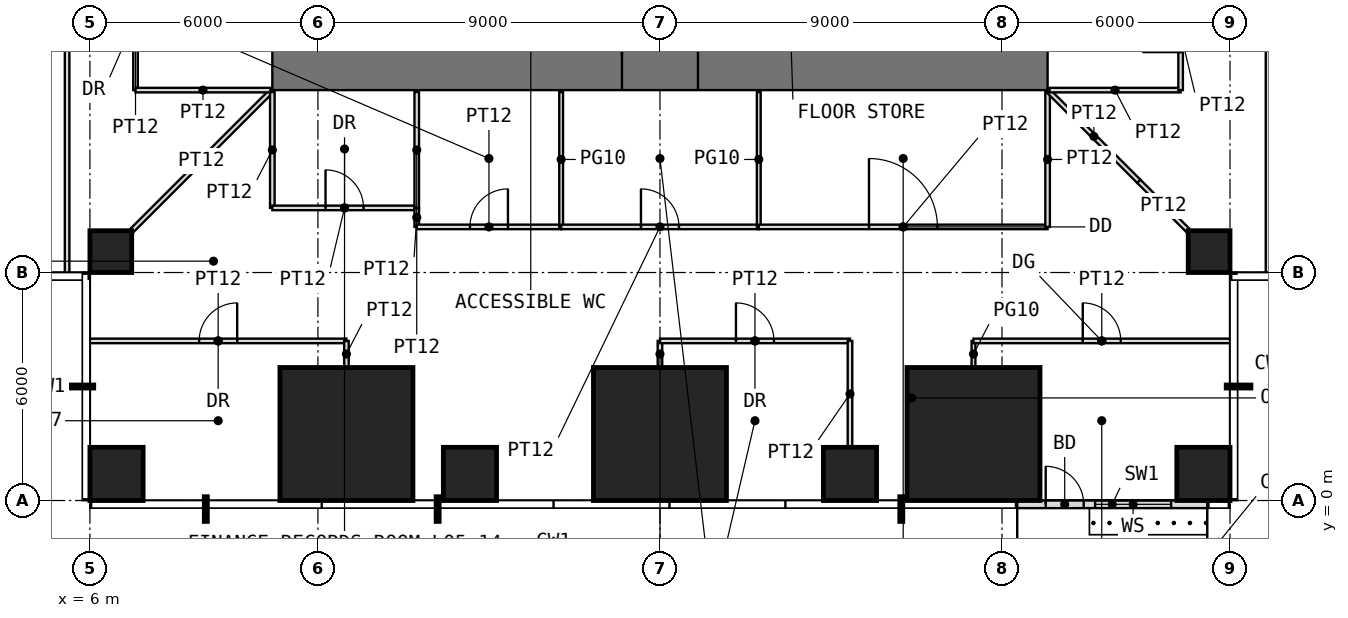
"""IFC4 building model, lengths in metres.
Left out: names, types, materials, properties, quantities, classifications, styles, units other than length and angle.
Written with IfcOpenShell. Run it as: python <this file> out.ifc"""

import sys

from ifc_helpers import new_model, si_unit, direction, frame, frame_2d, origin, origin_2d, place, context, subcontext, project, spatial, rectangle, extrude, element, fill, save


model = new_model("IFC4")
c1 = context("Model", 3, precision=1e-05, world=origin(), true_north=direction((0.0, 1.0)))
c2 = subcontext(c1, "Body", "Model", "MODEL_VIEW")
j1 = project(units=[si_unit("LENGTHUNIT", "METRE"), si_unit("PLANEANGLEUNIT", "RADIAN")], contexts=[c1])
p1 = place(None, origin())
s1 = spatial("IfcSite", under=j1, at=p1, CompositionType="ELEMENT")
p2 = place(p1, origin())
s2 = spatial("IfcBuilding", under=s1, at=p2, CompositionType="ELEMENT")
p3 = place(p2, frame((0.0, 0.0, 26.5)))
s3 = spatial("IfcBuildingStorey", under=s2, at=p3, CompositionType="ELEMENT", Elevation=26.5)
p4 = place(p3, frame((6.7, 0.7, 0.0), z_axis=(0.0, 0.0, 1.0), x_axis=(1.0, 0.0, 0.0)))
e1 = element("IfcColumn", 1, at=p4, inside=s3, PredefinedType="COLUMN", context=c2, shape_type="SweptSolid", body=[
    extrude(rectangle(XDim=1.4, YDim=1.4, at=origin_2d()), origin(), (0.0, 0.0, 1.0), 4.0),
])
p5 = place(p3, frame((12.75, 1.75, 0.0), z_axis=(0.0, 0.0, 1.0), x_axis=(1.0, 0.0, 0.0)))
e2 = element("IfcColumn", 2, at=p5, inside=s3, PredefinedType="COLUMN", context=c2, shape_type="SweptSolid", body=[
    extrude(rectangle(XDim=3.5, YDim=3.5, at=origin_2d()), origin(), (0.0, 0.0, 1.0), 4.0),
])
p6 = place(p3, frame((16.0, 0.7, 0.0), z_axis=(0.0, 0.0, 1.0), x_axis=(1.0, 0.0, 0.0)))
e3 = element("IfcColumn", 3, at=p6, inside=s3, PredefinedType="COLUMN", context=c2, shape_type="SweptSolid", body=[
    extrude(rectangle(XDim=1.4, YDim=1.4, at=origin_2d()), origin(), (0.0, 0.0, 1.0), 4.0),
])
p7 = place(p3, frame((21.0, 1.75, 0.0), z_axis=(0.0, 0.0, 1.0), x_axis=(1.0, 0.0, 0.0)))
e4 = element("IfcColumn", 4, at=p7, inside=s3, PredefinedType="COLUMN", context=c2, shape_type="SweptSolid", body=[
    extrude(rectangle(XDim=3.5, YDim=3.5, at=origin_2d()), origin(), (0.0, 0.0, 1.0), 4.0),
])
p8 = place(p3, frame((26.0, 0.7, 0.0), z_axis=(0.0, 0.0, 1.0), x_axis=(1.0, 0.0, 0.0)))
e5 = element("IfcColumn", 5, at=p8, inside=s3, PredefinedType="COLUMN", context=c2, shape_type="SweptSolid", body=[
    extrude(rectangle(XDim=1.4, YDim=1.4, at=origin_2d()), origin(), (0.0, 0.0, 1.0), 4.0),
])
p9 = place(p3, frame((29.25, 1.75, 0.0), z_axis=(0.0, 0.0, 1.0), x_axis=(1.0, 0.0, 0.0)))
e6 = element("IfcColumn", 6, at=p9, inside=s3, PredefinedType="COLUMN", context=c2, shape_type="SweptSolid", body=[
    extrude(rectangle(XDim=3.5, YDim=3.5, at=origin_2d()), origin(), (0.0, 0.0, 1.0), 4.0),
])
p10 = place(p3, frame((35.3, 0.7, 0.0), z_axis=(0.0, 0.0, 1.0), x_axis=(1.0, 0.0, 0.0)))
e7 = element("IfcColumn", 7, at=p10, inside=s3, PredefinedType="COLUMN", context=c2, shape_type="SweptSolid", body=[
    extrude(rectangle(XDim=1.4, YDim=1.4, at=origin_2d()), origin(), (0.0, 0.0, 1.0), 4.0),
])
for number, where, z_axis, x_axis in (
    (8, (6.55, 6.55, 0.0), (0.0, 0.0, 1.0), (1.0, 0.0, 0.0)),
    (9, (35.45, 6.55, 0.0), (0.0, 0.0, 1.0), (1.0, 0.0, 0.0)),
):
    element("IfcColumn", number, at=place(p3, frame(where, z_axis=z_axis, x_axis=x_axis)), inside=s3, PredefinedType="COLUMN", context=c2, shape_type="SweptSolid", body=[
        extrude(rectangle(XDim=1.1, YDim=1.1, at=origin_2d()), origin(), (0.0, 0.0, 1.0), 4.0),
    ])
p11 = place(p3, frame((30.4, -0.1, 0.0), z_axis=(0.0, 0.0, 1.0), x_axis=(1.0, 0.0, 0.0)))
e10 = element("IfcWall", 10, at=p11, inside=s3, PredefinedType="USERDEFINED", context=c2, shape_type="SweptSolid", body=[
    extrude(rectangle(XDim=5.0, YDim=0.2, at=frame_2d((2.5, 0.0))), origin(), (0.0, 0.0, 1.0), 3.75),
])
p12 = place(p11, frame((0.75, 0.0, 0.0)))
e11 = element("IfcOpeningElement", 11, at=p12, cuts=e10, PredefinedType="OPENING", context=c2, shape_type="SweptSolid", body=[
    extrude(rectangle(XDim=1.0, YDim=2.4, at=frame_2d((0.5, 1.2))), frame((0.0, 0.11, 0.0), z_axis=(0.0, -1.0, 0.0), x_axis=(1.0, 0.0, 0.0)), (0.0, 0.0, 1.0), 0.22),
])
p13 = place(p11, frame((2.05, 0.0, 0.3)))
e12 = element("IfcOpeningElement", 12, at=p13, cuts=e10, PredefinedType="OPENING", context=c2, shape_type="SweptSolid", body=[
    extrude(rectangle(XDim=2.0, YDim=2.7, at=frame_2d((1.0, 1.35))), frame((0.0, 0.11, 0.0), z_axis=(0.0, -1.0, 0.0), x_axis=(1.0, 0.0, 0.0)), (0.0, 0.0, 1.0), 0.22),
])
p14 = place(p3, frame((10.8, 11.7, -0.05), z_axis=(0.0, 0.0, 1.0), x_axis=(1.0, 0.0, 0.0)))
e13 = element("IfcWall", 13, at=p14, inside=s3, PredefinedType="SHEAR", context=c2, shape_type="SweptSolid", body=[
    extrude(rectangle(XDim=20.4, YDim=1.8, at=frame_2d((10.2, 0.0))), origin(), (0.0, 0.0, 1.0), 4.0),
])
p15 = place(p14, frame((9.2, 0.0, 0.05)))
e14 = element("IfcOpeningElement", 14, at=p15, cuts=e13, PredefinedType="OPENING", context=c2, shape_type="SweptSolid", body=[
    extrude(rectangle(XDim=2.0, YDim=2.2, at=frame_2d((1.0, 1.1))), frame((0.0, 0.91, 0.0), z_axis=(0.0, -1.0, 0.0), x_axis=(1.0, 0.0, 0.0)), (0.0, 0.0, 1.0), 1.82),
])
p16 = place(p3, frame((5.4, 6.0, 0.0), z_axis=(0.0, 0.0, 1.0), x_axis=(0.0, 1.0, 0.0)))
e15 = element("IfcWall", 15, at=p16, inside=s3, PredefinedType="PARTITIONING", context=c2, shape_type="SweptSolid", body=[
    extrude(rectangle(XDim=30.0, YDim=0.12, at=frame_2d((15.0, 0.0))), origin(), (0.0, 0.0, 1.0), 3.75),
])
p17 = place(p16, frame((14.5, 0.0, 0.0)))
e16 = element("IfcOpeningElement", 16, at=p17, cuts=e15, PredefinedType="OPENING", context=c2, shape_type="SweptSolid", body=[
    extrude(rectangle(XDim=1.0, YDim=2.4, at=frame_2d((0.5, 1.2))), frame((0.0, 0.07, 0.0), z_axis=(0.0, -1.0, 0.0), x_axis=(1.0, 0.0, 0.0)), (0.0, 0.0, 1.0), 0.14),
])
p18 = place(p3, frame((6.0, 4.2, 0.0), z_axis=(0.0, 0.0, 1.0), x_axis=(1.0, 0.0, 0.0)))
e17 = element("IfcWall", 17, at=p18, inside=s3, PredefinedType="PARTITIONING", context=c2, shape_type="SweptSolid", body=[
    extrude(rectangle(XDim=6.75, YDim=0.12, at=frame_2d((3.375, 0.0))), origin(), (0.0, 0.0, 1.0), 3.75),
])
p19 = place(p18, frame((2.875, 0.0, 0.0)))
e18 = element("IfcOpeningElement", 18, at=p19, cuts=e17, PredefinedType="OPENING", context=c2, shape_type="SweptSolid", body=[
    extrude(rectangle(XDim=1.0, YDim=2.2, at=frame_2d((0.5, 1.1))), frame((0.0, 0.07, 0.0), z_axis=(0.0, -1.0, 0.0), x_axis=(1.0, 0.0, 0.0)), (0.0, 0.0, 1.0), 0.14),
])
p20 = place(p3, frame((7.11, 7.11, 0.0), z_axis=(0.0, 0.0, 1.0), x_axis=(0.707106781187, 0.707106781187, 0.0)))
e19 = element("IfcWall", 19, at=p20, inside=s3, PredefinedType="PARTITIONING", context=c2, shape_type="SweptSolid", body=[
    extrude(rectangle(XDim=5.168, YDim=0.12, at=frame_2d((2.584, 0.0))), origin(), (0.0, 0.0, 1.0), 3.75),
])
p21 = place(p3, frame((7.2, 10.8, 0.0), z_axis=(0.0, 0.0, 1.0), x_axis=(0.0, 1.0, 0.0)))
e20 = element("IfcWall", 20, at=p21, inside=s3, PredefinedType="PARTITIONING", context=c2, shape_type="SweptSolid", body=[
    extrude(rectangle(XDim=3.8, YDim=0.12, at=frame_2d((1.9, 0.0))), origin(), (0.0, 0.0, 1.0), 3.75),
])
p22 = place(p21, frame((1.4, 0.0, 0.0)))
e21 = element("IfcOpeningElement", 21, at=p22, cuts=e20, PredefinedType="OPENING", context=c2, shape_type="SweptSolid", body=[
    extrude(rectangle(XDim=1.0, YDim=2.2, at=frame_2d((0.5, 1.1))), frame((0.0, 0.07, 0.0), z_axis=(0.0, -1.0, 0.0), x_axis=(1.0, 0.0, 0.0)), (0.0, 0.0, 1.0), 0.14),
])
p23 = place(p3, frame((7.2, 10.8, 0.0), z_axis=(0.0, 0.0, 1.0), x_axis=(1.0, 0.0, 0.0)))
e22 = element("IfcWall", 22, at=p23, inside=s3, PredefinedType="PARTITIONING", context=c2, shape_type="SweptSolid", body=[
    extrude(rectangle(XDim=3.55, YDim=0.12, at=frame_2d((1.775, 0.0))), origin(), (0.0, 0.0, 1.0), 3.75),
])
p24 = place(p3, frame((10.8, 7.7, 0.0), z_axis=(0.0, 0.0, 1.0), x_axis=(0.0, 1.0, 0.0)))
e23 = element("IfcWall", 23, at=p24, inside=s3, PredefinedType="PARTITIONING", context=c2, shape_type="SweptSolid", body=[
    extrude(rectangle(XDim=3.05, YDim=0.12, at=frame_2d((1.525, 0.0))), origin(), (0.0, 0.0, 1.0), 3.75),
])
p25 = place(p3, frame((10.8, 7.7, 0.0), z_axis=(0.0, 0.0, 1.0), x_axis=(1.0, 0.0, 0.0)))
e24 = element("IfcWall", 24, at=p25, inside=s3, PredefinedType="PARTITIONING", context=c2, shape_type="SweptSolid", body=[
    extrude(rectangle(XDim=3.8, YDim=0.12, at=frame_2d((1.9, 0.0))), origin(), (0.0, 0.0, 1.0), 3.75),
])
p26 = place(p25, frame((1.4, 0.0, 0.0)))
e25 = element("IfcOpeningElement", 25, at=p26, cuts=e24, PredefinedType="OPENING", context=c2, shape_type="SweptSolid", body=[
    extrude(rectangle(XDim=1.0, YDim=2.2, at=frame_2d((0.5, 1.1))), frame((0.0, 0.07, 0.0), z_axis=(0.0, -1.0, 0.0), x_axis=(1.0, 0.0, 0.0)), (0.0, 0.0, 1.0), 0.14),
])
p27 = place(p3, frame((12.75, 3.51, 0.0), z_axis=(0.0, 0.0, 1.0), x_axis=(0.0, 1.0, 0.0)))
e26 = element("IfcWall", 26, at=p27, inside=s3, PredefinedType="PARTITIONING", context=c2, shape_type="SweptSolid", body=[
    extrude(rectangle(XDim=0.69, YDim=0.12, at=frame_2d((0.345, 0.0))), origin(), (0.0, 0.0, 1.0), 3.75),
])
p28 = place(p3, frame((14.6, 7.2, 0.0), z_axis=(0.0, 0.0, 1.0), x_axis=(0.0, 1.0, 0.0)))
e27 = element("IfcWall", 27, at=p28, inside=s3, PredefinedType="PARTITIONING", context=c2, shape_type="SweptSolid", body=[
    extrude(rectangle(XDim=0.5, YDim=0.12, at=frame_2d((0.25, 0.0))), origin(), (0.0, 0.0, 1.0), 3.75),
])
p29 = place(p3, frame((14.6, 7.2, 0.0), z_axis=(0.0, 0.0, 1.0), x_axis=(1.0, 0.0, 0.0)))
e28 = element("IfcWall", 28, at=p29, inside=s3, PredefinedType="PARTITIONING", context=c2, shape_type="SweptSolid", body=[
    extrude(rectangle(XDim=3.8, YDim=0.12, at=frame_2d((1.9, 0.0))), origin(), (0.0, 0.0, 1.0), 3.75),
])
p30 = place(p29, frame((1.4, 0.0, 0.0)))
e29 = element("IfcOpeningElement", 29, at=p30, cuts=e28, PredefinedType="OPENING", context=c2, shape_type="SweptSolid", body=[
    extrude(rectangle(XDim=1.0, YDim=2.4, at=frame_2d((0.5, 1.2))), frame((0.0, 0.07, 0.0), z_axis=(0.0, -1.0, 0.0), x_axis=(1.0, 0.0, 0.0)), (0.0, 0.0, 1.0), 0.14),
])
p31 = place(p3, frame((14.6, 7.7, 0.0), z_axis=(0.0, 0.0, 1.0), x_axis=(0.0, 1.0, 0.0)))
e30 = element("IfcWall", 30, at=p31, inside=s3, PredefinedType="PARTITIONING", context=c2, shape_type="SweptSolid", body=[
    extrude(rectangle(XDim=3.05, YDim=0.12, at=frame_2d((1.525, 0.0))), origin(), (0.0, 0.0, 1.0), 3.75),
])
p32 = place(p3, frame((18.4, 7.2, 0.0), z_axis=(0.0, 0.0, 1.0), x_axis=(0.0, 1.0, 0.0)))
e31 = element("IfcWall", 31, at=p32, inside=s3, PredefinedType="PARTITIONING", context=c2, shape_type="SweptSolid", body=[
    extrude(rectangle(XDim=3.55, YDim=0.1, at=frame_2d((1.775, 0.0))), origin(), (0.0, 0.0, 1.0), 3.75),
])
p33 = place(p3, frame((18.4, 7.2, 0.0), z_axis=(0.0, 0.0, 1.0), x_axis=(1.0, 0.0, 0.0)))
e32 = element("IfcWall", 32, at=p33, inside=s3, PredefinedType="PARTITIONING", context=c2, shape_type="SweptSolid", body=[
    extrude(rectangle(XDim=5.2, YDim=0.12, at=frame_2d((2.6, 0.0))), origin(), (0.0, 0.0, 1.0), 3.75),
])
p34 = place(p33, frame((2.1, 0.0, 0.0)))
e33 = element("IfcOpeningElement", 33, at=p34, cuts=e32, PredefinedType="OPENING", context=c2, shape_type="SweptSolid", body=[
    extrude(rectangle(XDim=1.0, YDim=2.4, at=frame_2d((0.5, 1.2))), frame((0.0, 0.07, 0.0), z_axis=(0.0, -1.0, 0.0), x_axis=(1.0, 0.0, 0.0)), (0.0, 0.0, 1.0), 0.14),
])
p35 = place(p3, frame((21.0, 3.51, 0.0), z_axis=(0.0, 0.0, 1.0), x_axis=(0.0, 1.0, 0.0)))
e34 = element("IfcWall", 34, at=p35, inside=s3, PredefinedType="PARTITIONING", context=c2, shape_type="SweptSolid", body=[
    extrude(rectangle(XDim=0.69, YDim=0.12, at=frame_2d((0.345, 0.0))), origin(), (0.0, 0.0, 1.0), 3.75),
])
p36 = place(p3, frame((21.0, 4.2, 0.0), z_axis=(0.0, 0.0, 1.0), x_axis=(1.0, 0.0, 0.0)))
e35 = element("IfcWall", 35, at=p36, inside=s3, PredefinedType="PARTITIONING", context=c2, shape_type="SweptSolid", body=[
    extrude(rectangle(XDim=5.0, YDim=0.12, at=frame_2d((2.5, 0.0))), origin(), (0.0, 0.0, 1.0), 3.75),
])
p37 = place(p36, frame((2.0, 0.0, 0.0)))
e36 = element("IfcOpeningElement", 36, at=p37, cuts=e35, PredefinedType="OPENING", context=c2, shape_type="SweptSolid", body=[
    extrude(rectangle(XDim=1.0, YDim=2.2, at=frame_2d((0.5, 1.1))), frame((0.0, 0.07, 0.0), z_axis=(0.0, -1.0, 0.0), x_axis=(1.0, 0.0, 0.0)), (0.0, 0.0, 1.0), 0.14),
])
p38 = place(p3, frame((23.6, 7.2, 0.0), z_axis=(0.0, 0.0, 1.0), x_axis=(0.0, 1.0, 0.0)))
e37 = element("IfcWall", 37, at=p38, inside=s3, PredefinedType="PARTITIONING", context=c2, shape_type="SweptSolid", body=[
    extrude(rectangle(XDim=3.55, YDim=0.1, at=frame_2d((1.775, 0.0))), origin(), (0.0, 0.0, 1.0), 3.75),
])
p39 = place(p3, frame((23.6, 7.2, 0.0), z_axis=(0.0, 0.0, 1.0), x_axis=(1.0, 0.0, 0.0)))
e38 = element("IfcWall", 38, at=p39, inside=s3, PredefinedType="PARTITIONING", context=c2, shape_type="SweptSolid", body=[
    extrude(rectangle(XDim=7.6, YDim=0.12, at=frame_2d((3.8, 0.0))), origin(), (0.0, 0.0, 1.0), 3.75),
])
p40 = place(p39, frame((2.9, 0.0, 0.0)))
e39 = element("IfcOpeningElement", 39, at=p40, cuts=e38, PredefinedType="OPENING", context=c2, shape_type="SweptSolid", body=[
    extrude(rectangle(XDim=1.8, YDim=2.4, at=frame_2d((0.9, 1.2))), frame((0.0, 0.07, 0.0), z_axis=(0.0, -1.0, 0.0), x_axis=(1.0, 0.0, 0.0)), (0.0, 0.0, 1.0), 0.14),
])
p41 = place(p3, frame((26.0, 1.41, 0.0), z_axis=(0.0, 0.0, 1.0), x_axis=(0.0, 1.0, 0.0)))
e40 = element("IfcWall", 40, at=p41, inside=s3, PredefinedType="PARTITIONING", context=c2, shape_type="SweptSolid", body=[
    extrude(rectangle(XDim=2.79, YDim=0.12, at=frame_2d((1.395, 0.0))), origin(), (0.0, 0.0, 1.0), 3.75),
])
p42 = place(p3, frame((29.25, 3.51, 0.0), z_axis=(0.0, 0.0, 1.0), x_axis=(0.0, 1.0, 0.0)))
e41 = element("IfcWall", 41, at=p42, inside=s3, PredefinedType="PARTITIONING", context=c2, shape_type="SweptSolid", body=[
    extrude(rectangle(XDim=0.69, YDim=0.1, at=frame_2d((0.345, 0.0))), origin(), (0.0, 0.0, 1.0), 3.75),
])
p43 = place(p3, frame((29.25, 4.2, 0.0), z_axis=(0.0, 0.0, 1.0), x_axis=(1.0, 0.0, 0.0)))
e42 = element("IfcWall", 42, at=p43, inside=s3, PredefinedType="PARTITIONING", context=c2, shape_type="SweptSolid", body=[
    extrude(rectangle(XDim=6.75, YDim=0.12, at=frame_2d((3.375, 0.0))), origin(), (0.0, 0.0, 1.0), 3.75),
])
p44 = place(p43, frame((2.875, 0.0, 0.0)))
e43 = element("IfcOpeningElement", 43, at=p44, cuts=e42, PredefinedType="OPENING", context=c2, shape_type="SweptSolid", body=[
    extrude(rectangle(XDim=1.0, YDim=2.4, at=frame_2d((0.5, 1.2))), frame((0.0, 0.07, 0.0), z_axis=(0.0, -1.0, 0.0), x_axis=(1.0, 0.0, 0.0)), (0.0, 0.0, 1.0), 0.14),
])
p45 = place(p3, frame((31.2, 7.2, 0.0), z_axis=(0.0, 0.0, 1.0), x_axis=(0.0, 1.0, 0.0)))
e44 = element("IfcWall", 44, at=p45, inside=s3, PredefinedType="PARTITIONING", context=c2, shape_type="SweptSolid", body=[
    extrude(rectangle(XDim=3.55, YDim=0.12, at=frame_2d((1.775, 0.0))), origin(), (0.0, 0.0, 1.0), 3.75),
])
p46 = place(p3, frame((31.235, 10.765, 0.0), z_axis=(0.0, 0.0, 1.0), x_axis=(0.707106781187, -0.707106781187, 0.0)))
e45 = element("IfcWall", 45, at=p46, inside=s3, PredefinedType="PARTITIONING", context=c2, shape_type="SweptSolid", body=[
    extrude(rectangle(XDim=3.346, YDim=0.12, at=frame_2d((1.673, 0.0))), origin(), (0.0, 0.0, 1.0), 3.75),
])
p47 = place(p3, frame((31.25, 10.8, 0.0), z_axis=(0.0, 0.0, 1.0), x_axis=(1.0, 0.0, 0.0)))
e46 = element("IfcWall", 46, at=p47, inside=s3, PredefinedType="PARTITIONING", context=c2, shape_type="SweptSolid", body=[
    extrude(rectangle(XDim=3.45, YDim=0.12, at=frame_2d((1.725, 0.0))), origin(), (0.0, 0.0, 1.0), 3.75),
])
p48 = place(p3, frame((33.602, 8.398, 0.0), z_axis=(0.0, 0.0, 1.0), x_axis=(0.707106781187, -0.707106781187, 0.0)))
e47 = element("IfcWall", 47, at=p48, inside=s3, PredefinedType="PARTITIONING", context=c2, shape_type="SweptSolid", body=[
    extrude(rectangle(XDim=1.822, YDim=0.12, at=frame_2d((0.911, 0.0))), origin(), (0.0, 0.0, 1.0), 3.75),
])
p49 = place(p3, frame((34.7, 10.8, 0.0), z_axis=(0.0, 0.0, 1.0), x_axis=(0.0, 1.0, 0.0)))
e48 = element("IfcWall", 48, at=p49, inside=s3, PredefinedType="PARTITIONING", context=c2, shape_type="SweptSolid", body=[
    extrude(rectangle(XDim=3.0, YDim=0.12, at=frame_2d((1.5, 0.0))), origin(), (0.0, 0.0, 1.0), 3.75),
])
p50 = place(p49, frame((1.0, 0.0, 0.0)))
e49 = element("IfcOpeningElement", 49, at=p50, cuts=e48, PredefinedType="OPENING", context=c2, shape_type="SweptSolid", body=[
    extrude(rectangle(XDim=1.0, YDim=2.2, at=frame_2d((0.5, 1.1))), frame((0.0, 0.07, 0.0), z_axis=(0.0, -1.0, 0.0), x_axis=(1.0, 0.0, 0.0)), (0.0, 0.0, 1.0), 0.14),
])
p51 = place(p3, frame((37.0, 6.0, 0.0), z_axis=(0.0, 0.0, 1.0), x_axis=(0.0, 1.0, 0.0)))
e50 = element("IfcWall", 50, at=p51, inside=s3, PredefinedType="PARTITIONING", context=c2, shape_type="SweptSolid", body=[
    extrude(rectangle(XDim=30.0, YDim=0.12, at=frame_2d((15.0, 0.0))), origin(), (0.0, 0.0, 1.0), 3.75),
])
p52 = place(p51, frame((14.5, 0.0, 0.0)))
e51 = element("IfcOpeningElement", 51, at=p52, cuts=e50, PredefinedType="OPENING", context=c2, shape_type="SweptSolid", body=[
    extrude(rectangle(XDim=1.0, YDim=2.4, at=frame_2d((0.5, 1.2))), frame((0.0, 0.07, 0.0), z_axis=(0.0, -1.0, 0.0), x_axis=(1.0, 0.0, 0.0)), (0.0, 0.0, 1.0), 0.14),
])
p53 = place(p12, origin())
e52 = element("IfcDoor", 52, at=p53, inside=s3, OperationType="SINGLE_SWING_LEFT", PredefinedType="DOOR", context=c2, shape_type="SweptSolid", body=[
    extrude(rectangle(XDim=1.0, YDim=2.4, at=frame_2d((0.5, 1.2))), frame((0.0, 0.025, 0.0), z_axis=(0.0, -1.0, 0.0), x_axis=(1.0, 0.0, 0.0)), (0.0, 0.0, 1.0), 0.05),
])
fill(e11, e52)
p54 = place(p13, origin())
e53 = element("IfcWindow", 53, at=p54, inside=s3, PartitioningType="SINGLE_PANEL", PredefinedType="WINDOW", context=c2, shape_type="SweptSolid", body=[
    extrude(rectangle(XDim=2.0, YDim=2.7, at=frame_2d((1.0, 1.35))), frame((0.0, 0.03, 0.0), z_axis=(0.0, -1.0, 0.0), x_axis=(1.0, 0.0, 0.0)), (0.0, 0.0, 1.0), 0.06),
])
fill(e12, e53)
p55 = place(p15, origin())
e54 = element("IfcDoor", 54, at=p55, inside=s3, OperationType="DOUBLE_DOOR_SINGLE_SWING", PredefinedType="DOOR", context=c2, shape_type="SweptSolid", body=[
    extrude(rectangle(XDim=2.0, YDim=2.2, at=frame_2d((1.0, 1.1))), frame((0.0, 0.025, 0.0), z_axis=(0.0, -1.0, 0.0), x_axis=(1.0, 0.0, 0.0)), (0.0, 0.0, 1.0), 0.05),
])
fill(e14, e54)
p56 = place(p26, origin())
e55 = element("IfcDoor", 55, at=p56, inside=s3, OperationType="SINGLE_SWING_LEFT", PredefinedType="DOOR", context=c2, shape_type="SweptSolid", body=[
    extrude(rectangle(XDim=1.0, YDim=2.2, at=frame_2d((0.5, 1.1))), frame((0.0, 0.025, 0.0), z_axis=(0.0, -1.0, 0.0), x_axis=(1.0, 0.0, 0.0)), (0.0, 0.0, 1.0), 0.05),
])
fill(e25, e55)
p57 = place(p30, origin())
e56 = element("IfcDoor", 56, at=p57, inside=s3, OperationType="SINGLE_SWING_RIGHT", PredefinedType="DOOR", context=c2, shape_type="SweptSolid", body=[
    extrude(rectangle(XDim=1.0, YDim=2.4, at=frame_2d((0.5, 1.2))), frame((0.0, 0.025, 0.0), z_axis=(0.0, -1.0, 0.0), x_axis=(1.0, 0.0, 0.0)), (0.0, 0.0, 1.0), 0.05),
])
fill(e29, e56)
p58 = place(p40, origin())
e57 = element("IfcDoor", 57, at=p58, inside=s3, OperationType="DOUBLE_DOOR_SINGLE_SWING", PredefinedType="DOOR", context=c2, shape_type="SweptSolid", body=[
    extrude(rectangle(XDim=1.8, YDim=2.4, at=frame_2d((0.9, 1.2))), frame((0.0, 0.025, 0.0), z_axis=(0.0, -1.0, 0.0), x_axis=(1.0, 0.0, 0.0)), (0.0, 0.0, 1.0), 0.05),
])
fill(e39, e57)
p59 = place(p19, origin())
e58 = element("IfcDoor", 58, at=p59, inside=s3, OperationType="SINGLE_SWING_RIGHT", PredefinedType="DOOR", context=c2, shape_type="SweptSolid", body=[
    extrude(rectangle(XDim=1.0, YDim=2.2, at=frame_2d((0.5, 1.1))), frame((0.0, 0.025, 0.0), z_axis=(0.0, -1.0, 0.0), x_axis=(1.0, 0.0, 0.0)), (0.0, 0.0, 1.0), 0.05),
])
fill(e18, e58)
p60 = place(p37, origin())
e59 = element("IfcDoor", 59, at=p60, inside=s3, OperationType="SINGLE_SWING_LEFT", PredefinedType="DOOR", context=c2, shape_type="SweptSolid", body=[
    extrude(rectangle(XDim=1.0, YDim=2.2, at=frame_2d((0.5, 1.1))), frame((0.0, 0.025, 0.0), z_axis=(0.0, -1.0, 0.0), x_axis=(1.0, 0.0, 0.0)), (0.0, 0.0, 1.0), 0.05),
])
fill(e36, e59)
p61 = place(p44, origin())
e60 = element("IfcDoor", 60, at=p61, inside=s3, OperationType="SINGLE_SWING_LEFT", PredefinedType="DOOR", context=c2, shape_type="SweptSolid", body=[
    extrude(rectangle(XDim=1.0, YDim=2.4, at=frame_2d((0.5, 1.2))), frame((0.0, 0.025, 0.0), z_axis=(0.0, -1.0, 0.0), x_axis=(1.0, 0.0, 0.0)), (0.0, 0.0, 1.0), 0.05),
])
fill(e43, e60)
p62 = place(p34, origin())
e61 = element("IfcDoor", 61, at=p62, inside=s3, OperationType="SINGLE_SWING_LEFT", PredefinedType="DOOR", context=c2, shape_type="SweptSolid", body=[
    extrude(rectangle(XDim=1.0, YDim=2.4, at=frame_2d((0.5, 1.2))), frame((0.0, 0.025, 0.0), z_axis=(0.0, -1.0, 0.0), x_axis=(1.0, 0.0, 0.0)), (0.0, 0.0, 1.0), 0.05),
])
fill(e33, e61)
save(model, sys.argv[1])
